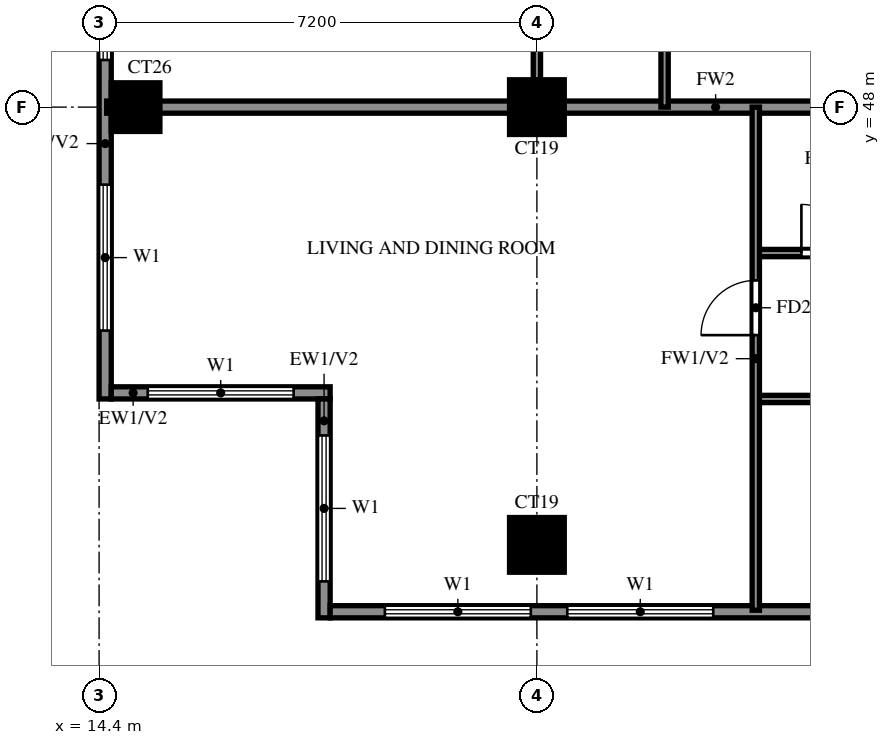
"""IFC4 building model, lengths in metres.
Left out: names, types, materials, properties, quantities, classifications, styles, units other than length and angle.
Written with IfcOpenShell. Run it as: python <this file> out.ifc"""

import sys

from ifc_helpers import new_model, si_unit, direction, frame, frame_2d, origin, origin_2d, place, context, subcontext, project, spatial, rectangle, extrude, source, transform, mapped, element, fill, save


model = new_model("IFC4")
c1 = context("Model", 3, precision=1e-05, world=origin(), true_north=direction((0.0, 1.0)))
c2 = subcontext(c1, "Body", "Model", "MODEL_VIEW")
j1 = project(units=[si_unit("LENGTHUNIT", "METRE"), si_unit("PLANEANGLEUNIT", "RADIAN")], contexts=[c1])
p1 = place(None, origin())
s1 = spatial("IfcSite", under=j1, at=p1, CompositionType="ELEMENT")
p2 = place(p1, origin())
s2 = spatial("IfcBuilding", under=s1, at=p2, CompositionType="ELEMENT")
p3 = place(p2, frame((0.0, 0.0, 185.0)))
s3 = spatial("IfcBuildingStorey", under=s2, at=p3, CompositionType="ELEMENT", Elevation=185.0)
m1 = source(origin(), c2, "Body", "SweptSolid", [
    extrude(rectangle(XDim=0.9, YDim=0.9, at=origin_2d()), origin(), (0.0, 0.0, 1.0), 3.2),
])
p4 = place(p3, frame((21.6, 40.8, 0.0), z_axis=(0.0, 0.0, 1.0), x_axis=(1.0, 0.0, 0.0)))
e1 = element("IfcColumn", 1, at=p4, inside=s3, PredefinedType="COLUMN", context=c2, shape_type="MappedRepresentation", body=[
    mapped(m1, transform((0.0, 0.0, 0.0))),
])
m2 = source(origin(), c2, "Body", "SweptSolid", [
    extrude(rectangle(XDim=0.8, YDim=0.8, at=origin_2d()), origin(), (0.0, 0.0, 1.0), 3.2),
])
p5 = place(p3, frame((15.0, 48.0, 0.0), z_axis=(0.0, 0.0, 1.0), x_axis=(1.0, 0.0, 0.0)))
e2 = element("IfcColumn", 2, at=p5, inside=s3, PredefinedType="COLUMN", context=c2, shape_type="MappedRepresentation", body=[
    mapped(m2, transform((0.0, 0.0, 0.0))),
])
p6 = place(p3, frame((21.6, 48.0, 0.0), z_axis=(0.0, 0.0, 1.0), x_axis=(1.0, 0.0, 0.0)))
e3 = element("IfcColumn", 3, at=p6, inside=s3, PredefinedType="COLUMN", context=c2, shape_type="MappedRepresentation", body=[
    mapped(m1, transform((0.0, 0.0, 0.0))),
])
p7 = place(p3, frame((14.5, 55.2, 0.0), z_axis=(0.0, 0.0, 1.0), x_axis=(0.0, -1.0, 0.0)))
e4 = element("IfcWall", 4, at=p7, inside=s3, PredefinedType="SOLIDWALL", context=c2, shape_type="SweptSolid", body=[
    extrude(rectangle(XDim=12.0, YDim=0.2, at=frame_2d((6.0, 0.0))), origin(), (0.0, 0.0, 1.0), 3.2),
])
p8 = place(p7, frame((8.475, 0.0, 0.6)))
e5 = element("IfcOpeningElement", 5, at=p8, cuts=e4, PredefinedType="OPENING", context=c2, shape_type="SweptSolid", body=[
    extrude(rectangle(XDim=2.4, YDim=2.4, at=frame_2d((1.2, 1.2))), frame((0.0, 0.11, 0.0), z_axis=(0.0, -1.0, 0.0), x_axis=(1.0, 0.0, 0.0)), (0.0, 0.0, 1.0), 0.22),
])
p9 = place(p7, frame((4.025, 0.0, 0.6)))
e6 = element("IfcOpeningElement", 6, at=p9, cuts=e4, PredefinedType="OPENING", context=c2, shape_type="SweptSolid", body=[
    extrude(rectangle(XDim=2.4, YDim=2.4, at=frame_2d((1.2, 1.2))), frame((0.0, 0.11, 0.0), z_axis=(0.0, -1.0, 0.0), x_axis=(1.0, 0.0, 0.0)), (0.0, 0.0, 1.0), 0.22),
])
p10 = place(p7, frame((0.775, 0.0, 0.6)))
e7 = element("IfcOpeningElement", 7, at=p10, cuts=e4, PredefinedType="OPENING", context=c2, shape_type="SweptSolid", body=[
    extrude(rectangle(XDim=2.4, YDim=2.4, at=frame_2d((1.2, 1.2))), frame((0.0, 0.11, 0.0), z_axis=(0.0, -1.0, 0.0), x_axis=(1.0, 0.0, 0.0)), (0.0, 0.0, 1.0), 0.22),
])
p11 = place(p3, frame((14.6, 43.3, 0.0), z_axis=(0.0, 0.0, 1.0), x_axis=(1.0, 0.0, 0.0)))
e8 = element("IfcWall", 8, at=p11, inside=s3, PredefinedType="SOLIDWALL", context=c2, shape_type="SweptSolid", body=[
    extrude(rectangle(XDim=3.6, YDim=0.2, at=frame_2d((1.8, 0.0))), origin(), (0.0, 0.0, 1.0), 3.2),
])
p12 = place(p11, frame((0.6, 0.0, 0.6)))
e9 = element("IfcOpeningElement", 9, at=p12, cuts=e8, PredefinedType="OPENING", context=c2, shape_type="SweptSolid", body=[
    extrude(rectangle(XDim=2.4, YDim=2.4, at=frame_2d((1.2, 1.2))), frame((0.0, 0.11, 0.0), z_axis=(0.0, -1.0, 0.0), x_axis=(1.0, 0.0, 0.0)), (0.0, 0.0, 1.0), 0.22),
])
p13 = place(p3, frame((18.1, 43.2, 0.0), z_axis=(0.0, 0.0, 1.0), x_axis=(0.0, -1.0, 0.0)))
e10 = element("IfcWall", 10, at=p13, inside=s3, PredefinedType="SOLIDWALL", context=c2, shape_type="SweptSolid", body=[
    extrude(rectangle(XDim=3.6, YDim=0.2, at=frame_2d((1.8, 0.0))), origin(), (0.0, 0.0, 1.0), 3.2),
])
p14 = place(p13, frame((0.6, 0.0, 0.6)))
e11 = element("IfcOpeningElement", 11, at=p14, cuts=e10, PredefinedType="OPENING", context=c2, shape_type="SweptSolid", body=[
    extrude(rectangle(XDim=2.4, YDim=2.4, at=frame_2d((1.2, 1.2))), frame((0.0, 0.11, 0.0), z_axis=(0.0, -1.0, 0.0), x_axis=(1.0, 0.0, 0.0)), (0.0, 0.0, 1.0), 0.22),
])
p15 = place(p3, frame((18.2, 39.7, 0.0), z_axis=(0.0, 0.0, 1.0), x_axis=(1.0, 0.0, 0.0)))
e12 = element("IfcWall", 12, at=p15, inside=s3, PredefinedType="SOLIDWALL", context=c2, shape_type="SweptSolid", body=[
    extrude(rectangle(XDim=23.8, YDim=0.2, at=frame_2d((11.9, 0.0))), origin(), (0.0, 0.0, 1.0), 3.2),
])
p16 = place(p15, frame((0.9, 0.0, 0.6)))
e13 = element("IfcOpeningElement", 13, at=p16, cuts=e12, PredefinedType="OPENING", context=c2, shape_type="SweptSolid", body=[
    extrude(rectangle(XDim=2.4, YDim=2.4, at=frame_2d((1.2, 1.2))), frame((0.0, 0.11, 0.0), z_axis=(0.0, -1.0, 0.0), x_axis=(1.0, 0.0, 0.0)), (0.0, 0.0, 1.0), 0.22),
])
p17 = place(p15, frame((3.9, 0.0, 0.6)))
e14 = element("IfcOpeningElement", 14, at=p17, cuts=e12, PredefinedType="OPENING", context=c2, shape_type="SweptSolid", body=[
    extrude(rectangle(XDim=2.4, YDim=2.4, at=frame_2d((1.2, 1.2))), frame((0.0, 0.11, 0.0), z_axis=(0.0, -1.0, 0.0), x_axis=(1.0, 0.0, 0.0)), (0.0, 0.0, 1.0), 0.22),
])
p18 = place(p15, frame((11.8, 0.0, 0.6)))
e15 = element("IfcOpeningElement", 15, at=p18, cuts=e12, PredefinedType="OPENING", context=c2, shape_type="SweptSolid", body=[
    extrude(rectangle(XDim=2.4, YDim=2.4, at=frame_2d((1.2, 1.2))), frame((0.0, 0.11, 0.0), z_axis=(0.0, -1.0, 0.0), x_axis=(1.0, 0.0, 0.0)), (0.0, 0.0, 1.0), 0.22),
])
p19 = place(p15, frame((8.35, 0.0, 1.5)))
e16 = element("IfcOpeningElement", 16, at=p19, cuts=e12, PredefinedType="OPENING", context=c2, shape_type="SweptSolid", body=[
    extrude(rectangle(XDim=0.9, YDim=0.9, at=frame_2d((0.45, 0.45))), frame((0.0, 0.11, 0.0), z_axis=(0.0, -1.0, 0.0), x_axis=(1.0, 0.0, 0.0)), (0.0, 0.0, 1.0), 0.22),
])
p20 = place(p3, frame((14.525, 48.0, 0.0), z_axis=(0.0, 0.0, 1.0), x_axis=(1.0, 0.0, 0.0)))
e17 = element("IfcWall", 17, at=p20, inside=s3, PredefinedType="SOLIDWALL", context=c2, shape_type="SweptSolid", body=[
    extrude(rectangle(XDim=19.075, YDim=0.2, at=frame_2d((9.538, 0.0))), origin(), (0.0, 0.0, 1.0), 3.2),
])
p21 = place(p3, frame((25.2, 43.2, 0.0), z_axis=(0.0, 0.0, 1.0), x_axis=(1.0, 0.0, 0.0)))
e18 = element("IfcWall", 18, at=p21, inside=s3, PredefinedType="PARTITIONING", context=c2, shape_type="SweptSolid", body=[
    extrude(rectangle(XDim=3.6, YDim=0.12, at=frame_2d((1.8, 0.0))), origin(), (0.0, 0.0, 1.0), 3.2),
])
p22 = place(p3, frame((25.2, 45.6, 0.0), z_axis=(0.0, 0.0, 1.0), x_axis=(1.0, 0.0, 0.0)))
e19 = element("IfcWall", 19, at=p22, inside=s3, PredefinedType="PARTITIONING", context=c2, shape_type="SweptSolid", body=[
    extrude(rectangle(XDim=6.0, YDim=0.12, at=frame_2d((3.0, 0.0))), origin(), (0.0, 0.0, 1.0), 3.2),
])
p23 = place(p22, frame((0.75, 0.0, 0.0)))
e20 = element("IfcOpeningElement", 20, at=p23, cuts=e19, PredefinedType="OPENING", context=c2, shape_type="SweptSolid", body=[
    extrude(rectangle(XDim=0.8, YDim=2.1, at=frame_2d((0.4, 1.05))), frame((0.0, 0.07, 0.0), z_axis=(0.0, -1.0, 0.0), x_axis=(1.0, 0.0, 0.0)), (0.0, 0.0, 1.0), 0.14),
])
p24 = place(p22, frame((3.7, 0.0, 0.0)))
e21 = element("IfcOpeningElement", 21, at=p24, cuts=e19, PredefinedType="OPENING", context=c2, shape_type="SweptSolid", body=[
    extrude(rectangle(XDim=0.9, YDim=2.1, at=frame_2d((0.45, 1.05))), frame((0.0, 0.07, 0.0), z_axis=(0.0, -1.0, 0.0), x_axis=(1.0, 0.0, 0.0)), (0.0, 0.0, 1.0), 0.14),
])
p25 = place(p3, frame((21.6, 48.0, 0.0), z_axis=(0.0, 0.0, 1.0), x_axis=(0.0, 1.0, 0.0)))
e22 = element("IfcWall", 22, at=p25, inside=s3, PredefinedType="PARTITIONING", context=c2, shape_type="SweptSolid", body=[
    extrude(rectangle(XDim=25.2, YDim=0.12, at=frame_2d((12.6, 0.0))), origin(), (0.0, 0.0, 1.0), 3.2),
])
p26 = place(p25, frame((1.35, 0.0, 0.0)))
e23 = element("IfcOpeningElement", 23, at=p26, cuts=e22, PredefinedType="OPENING", context=c2, shape_type="SweptSolid", body=[
    extrude(rectangle(XDim=0.9, YDim=2.1, at=frame_2d((0.45, 1.05))), frame((0.0, 0.07, 0.0), z_axis=(0.0, -1.0, 0.0), x_axis=(1.0, 0.0, 0.0)), (0.0, 0.0, 1.0), 0.14),
])
p27 = place(p25, frame((4.95, 0.0, 0.0)))
e24 = element("IfcOpeningElement", 24, at=p27, cuts=e22, PredefinedType="OPENING", context=c2, shape_type="SweptSolid", body=[
    extrude(rectangle(XDim=0.9, YDim=2.1, at=frame_2d((0.45, 1.05))), frame((0.0, 0.07, 0.0), z_axis=(0.0, -1.0, 0.0), x_axis=(1.0, 0.0, 0.0)), (0.0, 0.0, 1.0), 0.14),
])
p28 = place(p25, frame((8.25, 0.0, 0.0)))
e25 = element("IfcOpeningElement", 25, at=p28, cuts=e22, PredefinedType="OPENING", context=c2, shape_type="SweptSolid", body=[
    extrude(rectangle(XDim=1.5, YDim=2.1, at=frame_2d((0.75, 1.05))), frame((0.0, 0.07, 0.0), z_axis=(0.0, -1.0, 0.0), x_axis=(1.0, 0.0, 0.0)), (0.0, 0.0, 1.0), 0.14),
])
p29 = place(p25, frame((12.15, 0.0, 0.0)))
e26 = element("IfcOpeningElement", 26, at=p29, cuts=e22, PredefinedType="OPENING", context=c2, shape_type="SweptSolid", body=[
    extrude(rectangle(XDim=0.9, YDim=2.1, at=frame_2d((0.45, 1.05))), frame((0.0, 0.07, 0.0), z_axis=(0.0, -1.0, 0.0), x_axis=(1.0, 0.0, 0.0)), (0.0, 0.0, 1.0), 0.14),
])
p30 = place(p25, frame((15.75, 0.0, 0.0)))
e27 = element("IfcOpeningElement", 27, at=p30, cuts=e22, PredefinedType="OPENING", context=c2, shape_type="SweptSolid", body=[
    extrude(rectangle(XDim=0.9, YDim=2.1, at=frame_2d((0.45, 1.05))), frame((0.0, 0.07, 0.0), z_axis=(0.0, -1.0, 0.0), x_axis=(1.0, 0.0, 0.0)), (0.0, 0.0, 1.0), 0.14),
])
p31 = place(p25, frame((19.35, 0.0, 0.0)))
e28 = element("IfcOpeningElement", 28, at=p31, cuts=e22, PredefinedType="OPENING", context=c2, shape_type="SweptSolid", body=[
    extrude(rectangle(XDim=0.9, YDim=2.1, at=frame_2d((0.45, 1.05))), frame((0.0, 0.07, 0.0), z_axis=(0.0, -1.0, 0.0), x_axis=(1.0, 0.0, 0.0)), (0.0, 0.0, 1.0), 0.14),
])
p32 = place(p25, frame((22.95, 0.0, 0.0)))
e29 = element("IfcOpeningElement", 29, at=p32, cuts=e22, PredefinedType="OPENING", context=c2, shape_type="SweptSolid", body=[
    extrude(rectangle(XDim=0.9, YDim=2.1, at=frame_2d((0.45, 1.05))), frame((0.0, 0.07, 0.0), z_axis=(0.0, -1.0, 0.0), x_axis=(1.0, 0.0, 0.0)), (0.0, 0.0, 1.0), 0.14),
])
p33 = place(p3, frame((23.7, 48.0, 0.0), z_axis=(0.0, 0.0, 1.0), x_axis=(0.0, 1.0, 0.0)))
e30 = element("IfcWall", 30, at=p33, inside=s3, PredefinedType="PARTITIONING", context=c2, shape_type="SweptSolid", body=[
    extrude(rectangle(XDim=3.6, YDim=0.12, at=frame_2d((1.8, 0.0))), origin(), (0.0, 0.0, 1.0), 3.2),
])
p34 = place(p3, frame((25.2, 39.725, 0.0), z_axis=(0.0, 0.0, 1.0), x_axis=(0.0, 1.0, 0.0)))
e31 = element("IfcWall", 31, at=p34, inside=s3, PredefinedType="PARTITIONING", context=c2, shape_type="SweptSolid", body=[
    extrude(rectangle(XDim=8.275, YDim=0.12, at=frame_2d((4.137, 0.0))), origin(), (0.0, 0.0, 1.0), 3.2),
])
p35 = place(p34, frame((4.525, 0.0, 0.0)))
e32 = element("IfcOpeningElement", 32, at=p35, cuts=e31, PredefinedType="OPENING", context=c2, shape_type="SweptSolid", body=[
    extrude(rectangle(XDim=0.9, YDim=2.1, at=frame_2d((0.45, 1.05))), frame((0.0, 0.07, 0.0), z_axis=(0.0, -1.0, 0.0), x_axis=(1.0, 0.0, 0.0)), (0.0, 0.0, 1.0), 0.14),
])
p36 = place(p8, origin())
e33 = element("IfcWindow", 33, at=p36, inside=s3, PartitioningType="DOUBLE_PANEL_VERTICAL", PredefinedType="WINDOW", context=c2, shape_type="SweptSolid", body=[
    extrude(rectangle(XDim=2.4, YDim=2.4, at=frame_2d((1.2, 1.2))), frame((0.0, 0.03, 0.0), z_axis=(0.0, -1.0, 0.0), x_axis=(1.0, 0.0, 0.0)), (0.0, 0.0, 1.0), 0.06),
])
fill(e5, e33)
p37 = place(p9, origin())
e34 = element("IfcWindow", 34, at=p37, inside=s3, PartitioningType="DOUBLE_PANEL_VERTICAL", PredefinedType="WINDOW", context=c2, shape_type="SweptSolid", body=[
    extrude(rectangle(XDim=2.4, YDim=2.4, at=frame_2d((1.2, 1.2))), frame((0.0, 0.03, 0.0), z_axis=(0.0, -1.0, 0.0), x_axis=(1.0, 0.0, 0.0)), (0.0, 0.0, 1.0), 0.06),
])
fill(e6, e34)
p38 = place(p12, origin())
e35 = element("IfcWindow", 35, at=p38, inside=s3, PartitioningType="DOUBLE_PANEL_VERTICAL", PredefinedType="WINDOW", context=c2, shape_type="SweptSolid", body=[
    extrude(rectangle(XDim=2.4, YDim=2.4, at=frame_2d((1.2, 1.2))), frame((0.0, 0.03, 0.0), z_axis=(0.0, -1.0, 0.0), x_axis=(1.0, 0.0, 0.0)), (0.0, 0.0, 1.0), 0.06),
])
fill(e9, e35)
p39 = place(p14, origin())
e36 = element("IfcWindow", 36, at=p39, inside=s3, PartitioningType="DOUBLE_PANEL_VERTICAL", PredefinedType="WINDOW", context=c2, shape_type="SweptSolid", body=[
    extrude(rectangle(XDim=2.4, YDim=2.4, at=frame_2d((1.2, 1.2))), frame((0.0, 0.03, 0.0), z_axis=(0.0, -1.0, 0.0), x_axis=(1.0, 0.0, 0.0)), (0.0, 0.0, 1.0), 0.06),
])
fill(e11, e36)
p40 = place(p16, origin())
e37 = element("IfcWindow", 37, at=p40, inside=s3, PartitioningType="DOUBLE_PANEL_VERTICAL", PredefinedType="WINDOW", context=c2, shape_type="SweptSolid", body=[
    extrude(rectangle(XDim=2.4, YDim=2.4, at=frame_2d((1.2, 1.2))), frame((0.0, 0.03, 0.0), z_axis=(0.0, -1.0, 0.0), x_axis=(1.0, 0.0, 0.0)), (0.0, 0.0, 1.0), 0.06),
])
fill(e13, e37)
p41 = place(p17, origin())
e38 = element("IfcWindow", 38, at=p41, inside=s3, PartitioningType="DOUBLE_PANEL_VERTICAL", PredefinedType="WINDOW", context=c2, shape_type="SweptSolid", body=[
    extrude(rectangle(XDim=2.4, YDim=2.4, at=frame_2d((1.2, 1.2))), frame((0.0, 0.03, 0.0), z_axis=(0.0, -1.0, 0.0), x_axis=(1.0, 0.0, 0.0)), (0.0, 0.0, 1.0), 0.06),
])
fill(e14, e38)
p42 = place(p35, origin())
e39 = element("IfcDoor", 39, at=p42, inside=s3, OperationType="SINGLE_SWING_LEFT", PredefinedType="DOOR", context=c2, shape_type="SweptSolid", body=[
    extrude(rectangle(XDim=0.9, YDim=2.1, at=frame_2d((0.45, 1.05))), frame((0.0, 0.025, 0.0), z_axis=(0.0, -1.0, 0.0), x_axis=(1.0, 0.0, 0.0)), (0.0, 0.0, 1.0), 0.05),
])
fill(e32, e39)
p43 = place(p23, origin())
e40 = element("IfcDoor", 40, at=p43, inside=s3, OperationType="SINGLE_SWING_LEFT", PredefinedType="DOOR", context=c2, shape_type="SweptSolid", body=[
    extrude(rectangle(XDim=0.8, YDim=2.1, at=frame_2d((0.4, 1.05))), frame((0.0, 0.025, 0.0), z_axis=(0.0, -1.0, 0.0), x_axis=(1.0, 0.0, 0.0)), (0.0, 0.0, 1.0), 0.05),
])
fill(e20, e40)
save(model, sys.argv[1])
